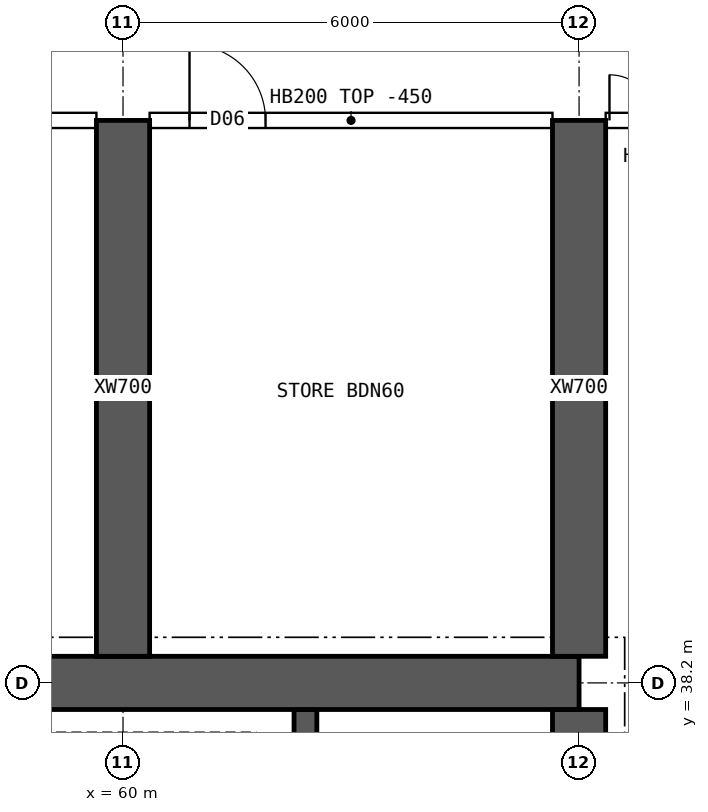
"""IFC4 building model, lengths in metres.
Left out: names, types, materials, properties, quantities, classifications, styles, units other than length and angle.
Written with IfcOpenShell. Run it as: python <this file> out.ifc"""

import sys

from ifc_helpers import new_model, si_unit, direction, frame, frame_2d, origin, place, context, subcontext, project, spatial, rectangle, extrude, element, fill, save


model = new_model("IFC4")
c1 = context("Model", 3, precision=1e-05, world=origin(), true_north=direction((0.0, 1.0)))
c2 = subcontext(c1, "Body", "Model", "MODEL_VIEW")
j1 = project(units=[si_unit("LENGTHUNIT", "METRE"), si_unit("PLANEANGLEUNIT", "RADIAN")], contexts=[c1])
p1 = place(None, origin())
s1 = spatial("IfcSite", under=j1, at=p1, CompositionType="ELEMENT")
p2 = place(p1, origin())
s2 = spatial("IfcBuilding", under=s1, at=p2, CompositionType="ELEMENT")
p3 = place(p2, frame((0.0, 0.0, 242.8)))
s3 = spatial("IfcBuildingStorey", under=s2, at=p3, CompositionType="ELEMENT", Elevation=242.8)
p4 = place(p3, frame((18.0, 38.2, 0.0), z_axis=(0.0, 0.0, 1.0), x_axis=(1.0, 0.0, 0.0)))
e1 = element("IfcWall", 1, at=p4, inside=s3, PredefinedType="SHEAR", context=c2, shape_type="SweptSolid", body=[
    extrude(rectangle(XDim=48.0, YDim=0.7, at=frame_2d((24.0, 0.0))), origin(), (0.0, 0.0, 1.0), 3.75),
])
p5 = place(p3, frame((66.0, 26.15, 0.0), z_axis=(0.0, 0.0, 1.0), x_axis=(0.0, 1.0, 0.0)))
e2 = element("IfcWall", 2, at=p5, inside=s3, PredefinedType="SHEAR", context=c2, shape_type="SweptSolid", body=[
    extrude(rectangle(XDim=11.7, YDim=0.7, at=frame_2d((5.85, 0.0))), origin(), (0.0, 0.0, 1.0), 3.75),
])
p6 = place(p5, frame((5.15, 0.0, 0.0)))
e3 = element("IfcOpeningElement", 3, at=p6, cuts=e2, PredefinedType="OPENING", context=c2, shape_type="SweptSolid", body=[
    extrude(rectangle(XDim=1.2, YDim=2.1, at=frame_2d((0.6, 1.05))), frame((0.0, 0.36, 0.0), z_axis=(0.0, -1.0, 0.0), x_axis=(1.0, 0.0, 0.0)), (0.0, 0.0, 1.0), 0.72),
])
p7 = place(p3, frame((62.4, 34.75, 0.0), z_axis=(0.0, 0.0, 1.0), x_axis=(0.0, 1.0, 0.0)))
e4 = element("IfcWall", 4, at=p7, inside=s3, PredefinedType="SHEAR", context=c2, shape_type="SweptSolid", body=[
    extrude(rectangle(XDim=3.1, YDim=0.3, at=frame_2d((1.55, 0.0))), origin(), (0.0, 0.0, 1.0), 3.75),
])
for number, where, z_axis, x_axis in (
    (5, (60.0, 38.55, 0.0), (0.0, 0.0, 1.0), (0.0, 1.0, 0.0)),
    (6, (66.0, 38.55, 0.0), (0.0, 0.0, 1.0), (0.0, 1.0, 0.0)),
):
    element("IfcWall", number, at=place(p3, frame(where, z_axis=z_axis, x_axis=x_axis)), inside=s3, PredefinedType="SHEAR", context=c2, shape_type="SweptSolid", body=[
        extrude(rectangle(XDim=7.05, YDim=0.7, at=frame_2d((3.525, 0.0))), origin(), (0.0, 0.0, 1.0), 3.75),
    ])
p8 = place(p3, frame((54.35, 45.6, 0.0), z_axis=(0.0, 0.0, 1.0), x_axis=(1.0, 0.0, 0.0)))
e7 = element("IfcWall", 7, at=p8, inside=s3, PredefinedType="SOLIDWALL", context=c2, shape_type="SweptSolid", body=[
    extrude(rectangle(XDim=5.3, YDim=0.2, at=frame_2d((2.65, 0.0))), origin(), (0.0, 0.0, 1.0), 3.3),
])
p9 = place(p8, frame((0.35, 0.0, 0.0)))
e8 = element("IfcOpeningElement", 8, at=p9, cuts=e7, PredefinedType="OPENING", context=c2, shape_type="SweptSolid", body=[
    extrude(rectangle(XDim=0.9, YDim=2.1, at=frame_2d((0.45, 1.05))), frame((0.0, 0.11, 0.0), z_axis=(0.0, -1.0, 0.0), x_axis=(1.0, 0.0, 0.0)), (0.0, 0.0, 1.0), 0.22),
])
p10 = place(p8, frame((2.615, 0.0, 0.0)))
e9 = element("IfcOpeningElement", 9, at=p10, cuts=e7, PredefinedType="OPENING", context=c2, shape_type="SweptSolid", body=[
    extrude(rectangle(XDim=0.9, YDim=2.1, at=frame_2d((0.45, 1.05))), frame((0.0, 0.11, 0.0), z_axis=(0.0, -1.0, 0.0), x_axis=(1.0, 0.0, 0.0)), (0.0, 0.0, 1.0), 0.22),
])
p11 = place(p3, frame((60.35, 45.6, 0.0), z_axis=(0.0, 0.0, 1.0), x_axis=(1.0, 0.0, 0.0)))
e10 = element("IfcWall", 10, at=p11, inside=s3, PredefinedType="SOLIDWALL", context=c2, shape_type="SweptSolid", body=[
    extrude(rectangle(XDim=5.3, YDim=0.2, at=frame_2d((2.65, 0.0))), origin(), (0.0, 0.0, 1.0), 3.3),
])
p12 = place(p11, frame((0.525, 0.0, 0.0)))
e11 = element("IfcOpeningElement", 11, at=p12, cuts=e10, PredefinedType="OPENING", context=c2, shape_type="SweptSolid", body=[
    extrude(rectangle(XDim=1.0, YDim=2.1, at=frame_2d((0.5, 1.05))), frame((0.0, 0.11, 0.0), z_axis=(0.0, -1.0, 0.0), x_axis=(1.0, 0.0, 0.0)), (0.0, 0.0, 1.0), 0.22),
])
p13 = place(p3, frame((66.35, 45.6, 0.0), z_axis=(0.0, 0.0, 1.0), x_axis=(1.0, 0.0, 0.0)))
e12 = element("IfcWall", 12, at=p13, inside=s3, PredefinedType="SOLIDWALL", context=c2, shape_type="SweptSolid", body=[
    extrude(rectangle(XDim=2.05, YDim=0.2, at=frame_2d((1.025, 0.0))), origin(), (0.0, 0.0, 1.0), 3.3),
])
p14 = place(p13, frame((0.05, 0.0, 0.0)))
e13 = element("IfcOpeningElement", 13, at=p14, cuts=e12, PredefinedType="OPENING", context=c2, shape_type="SweptSolid", body=[
    extrude(rectangle(XDim=1.2, YDim=2.1, at=frame_2d((0.6, 1.05))), frame((0.0, 0.11, 0.0), z_axis=(0.0, -1.0, 0.0), x_axis=(1.0, 0.0, 0.0)), (0.0, 0.0, 1.0), 0.22),
])
p15 = place(p14, origin())
e14 = element("IfcDoor", 14, at=p15, inside=s3, OperationType="DOUBLE_DOOR_SINGLE_SWING", PredefinedType="DOOR", context=c2, shape_type="SweptSolid", body=[
    extrude(rectangle(XDim=1.2, YDim=2.1, at=frame_2d((0.6, 1.05))), frame((0.0, 0.025, 0.0), z_axis=(0.0, -1.0, 0.0), x_axis=(1.0, 0.0, 0.0)), (0.0, 0.0, 1.0), 0.05),
])
fill(e13, e14)
p16 = place(p12, origin())
e15 = element("IfcDoor", 15, at=p16, inside=s3, OperationType="SINGLE_SWING_LEFT", PredefinedType="DOOR", context=c2, shape_type="SweptSolid", body=[
    extrude(rectangle(XDim=1.0, YDim=2.1, at=frame_2d((0.5, 1.05))), frame((0.0, 0.025, 0.0), z_axis=(0.0, -1.0, 0.0), x_axis=(1.0, 0.0, 0.0)), (0.0, 0.0, 1.0), 0.05),
])
fill(e11, e15)
save(model, sys.argv[1])
